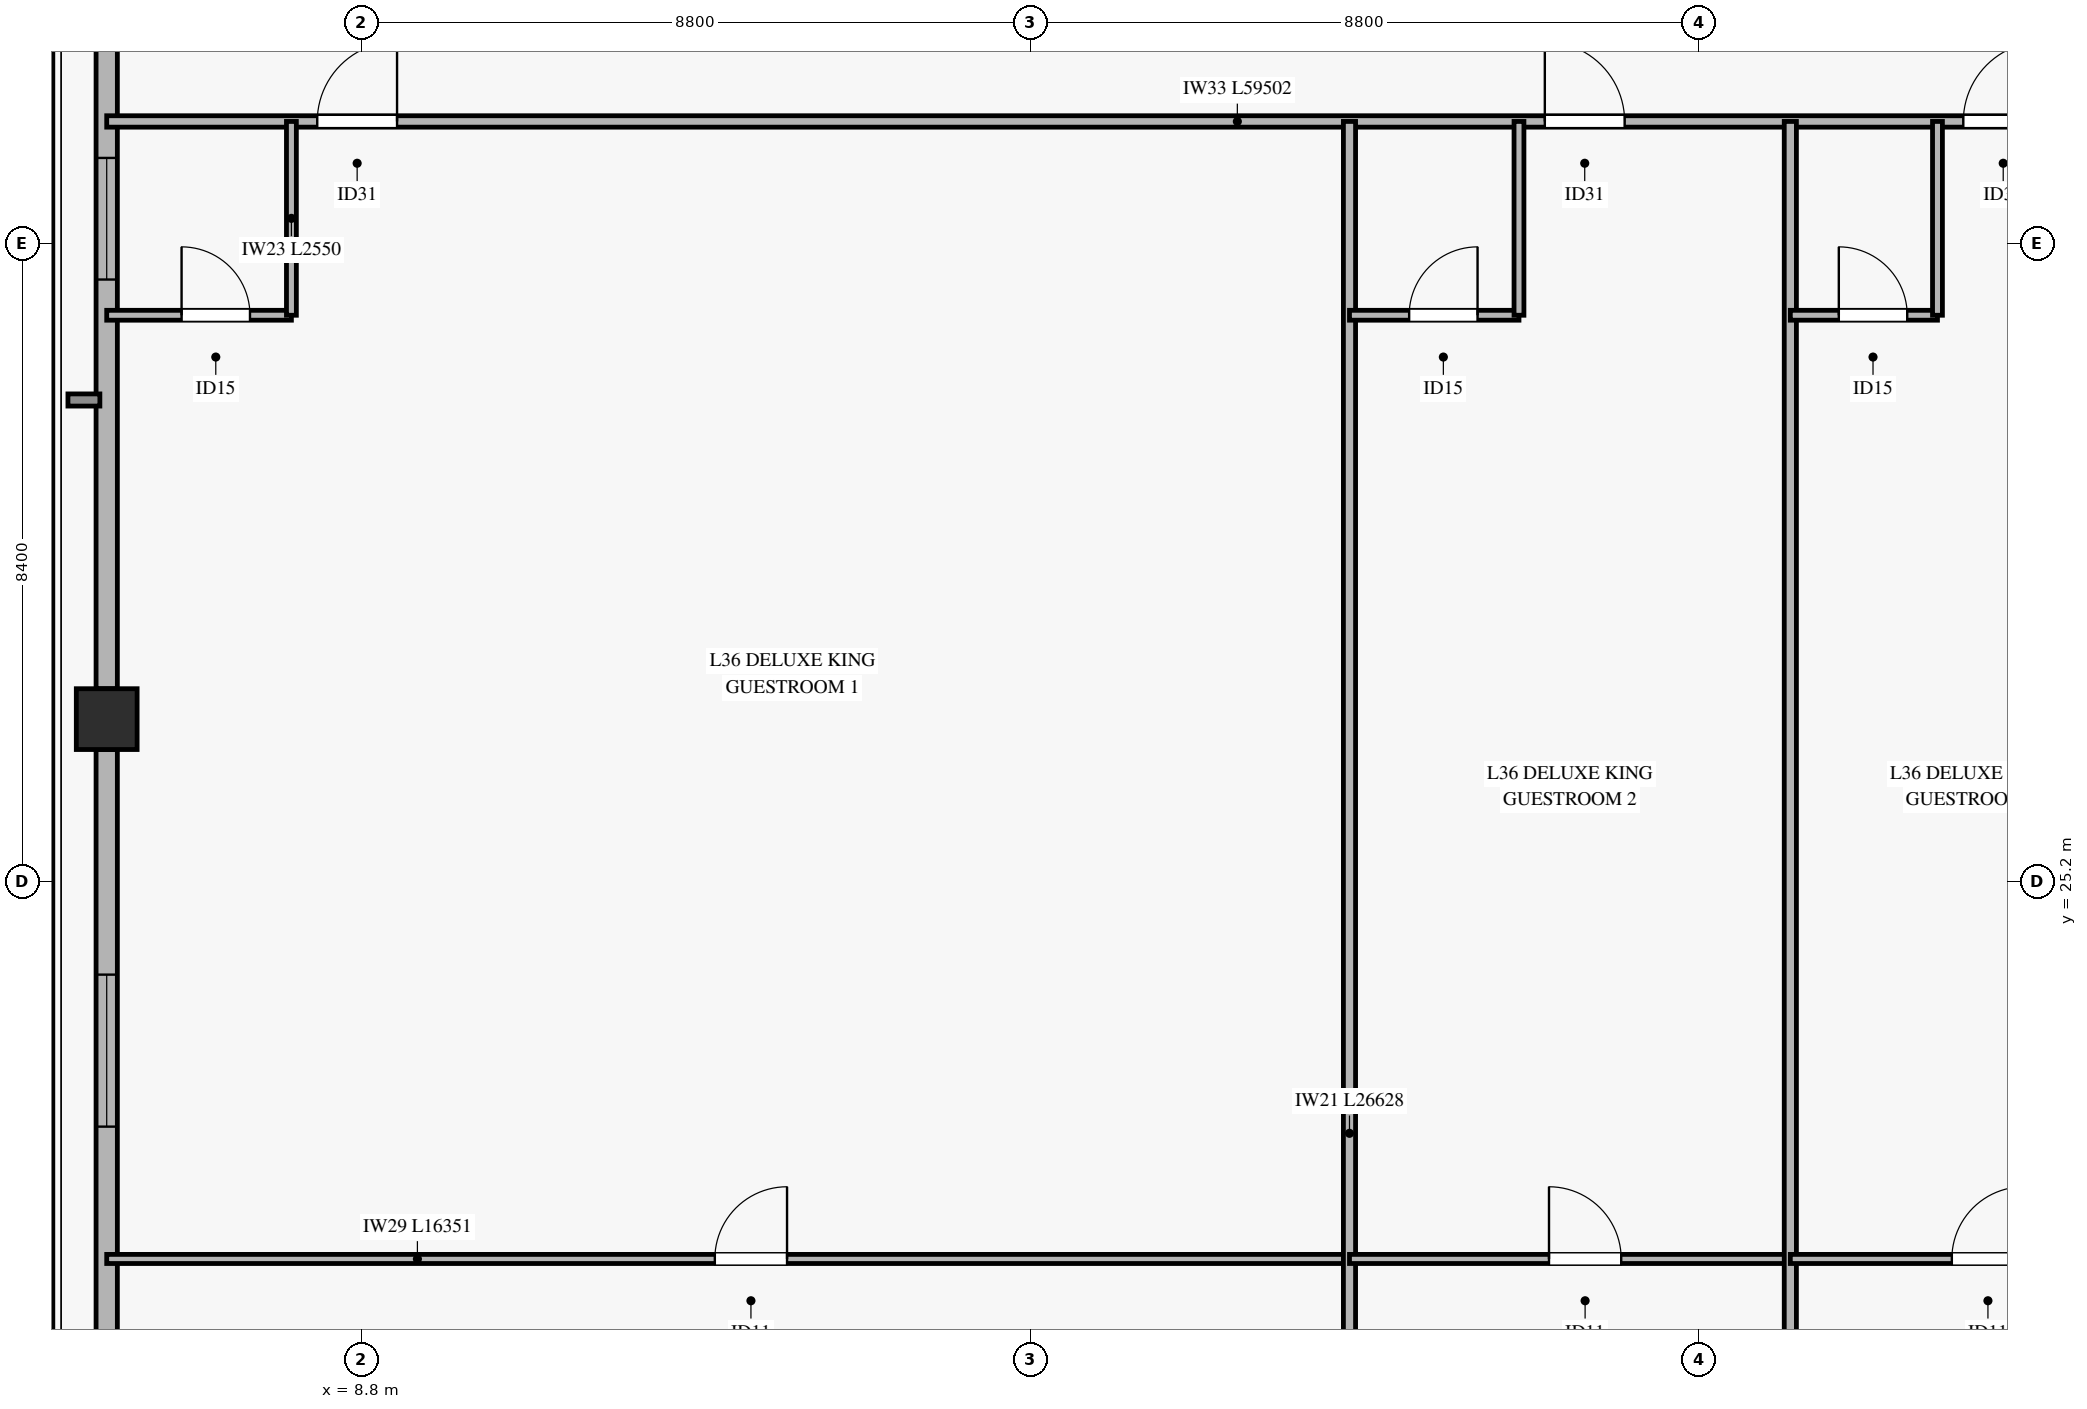
"""IFC4 building model, lengths in metres.
Left out: names, types, materials, properties, quantities, classifications, styles, units other than length and angle.
Written with IfcOpenShell. Run it as: python <this file> out.ifc"""

import sys

from ifc_helpers import new_model, si_unit, direction, frame, frame_2d, origin, origin_2d, place, context, subcontext, project, spatial, rectangle, hollow_rectangle, extrude, source, transform, mapped, element, fill, save


model = new_model("IFC4")
c1 = context("Model", 3, precision=1e-05, world=origin(), true_north=direction((0.0, 1.0)))
c2 = subcontext(c1, "Body", "Model", "MODEL_VIEW")
j1 = project(units=[si_unit("LENGTHUNIT", "METRE"), si_unit("PLANEANGLEUNIT", "RADIAN")], contexts=[c1])
p1 = place(None, origin())
s1 = spatial("IfcSite", under=j1, at=p1, CompositionType="ELEMENT")
p2 = place(p1, origin())
s2 = spatial("IfcBuilding", under=s1, at=p2, CompositionType="ELEMENT")
p3 = place(p2, frame((0.0, 0.0, 149.2)))
s3 = spatial("IfcBuildingStorey", under=s2, at=p3, CompositionType="ELEMENT", Elevation=149.2)
m1 = source(origin(), c2, "Body", "SweptSolid", [
    extrude(hollow_rectangle(XDim=0.8, YDim=0.8, WallThickness=0.036, at=origin_2d()), origin(), (0.0, 0.0, 1.0), 3.27),
])
p4 = place(p3, frame((5.449, 27.336, 0.0), z_axis=(0.0, 0.0, 1.0), x_axis=(1.0, 0.0, 0.0)))
e1 = element("IfcColumn", 1, at=p4, inside=s3, PredefinedType="COLUMN", context=c2, shape_type="MappedRepresentation", body=[
    mapped(m1, transform((0.0, 0.0, 0.0), x_axis=(1.0, 0.0, 0.0), y_axis=(0.0, 1.0, 0.0), z_axis=(0.0, 0.0, 1.0), scale=1.0)),
])
p5 = place(p3, frame((5.449, 11.511, 0.0), z_axis=(0.0, 0.0, 1.0), x_axis=(0.0, 1.0, 0.0)))
e2 = element("IfcWall", 2, at=p5, inside=s3, PredefinedType="SOLIDWALL", context=c2, shape_type="SweptSolid", body=[
    extrude(rectangle(XDim=15.425, YDim=0.28, at=frame_2d((7.712, 0.0))), origin(), (0.0, 0.0, 1.0), 2.75),
])
p6 = place(p5, frame((3.251, 0.0, 0.45)))
e3 = element("IfcOpeningElement", 3, at=p6, cuts=e2, PredefinedType="OPENING", context=c2, shape_type="SweptSolid", body=[
    extrude(rectangle(XDim=2.0, YDim=2.0, at=frame_2d((1.0, 1.0))), frame((0.0, 0.15, 0.0), z_axis=(0.0, -1.0, 0.0), x_axis=(1.0, 0.0, 0.0)), (0.0, 0.0, 1.0), 0.3),
])
p7 = place(p5, frame((10.463, 0.0, 0.45)))
e4 = element("IfcOpeningElement", 4, at=p7, cuts=e2, PredefinedType="OPENING", context=c2, shape_type="SweptSolid", body=[
    extrude(rectangle(XDim=2.0, YDim=2.0, at=frame_2d((1.0, 1.0))), frame((0.0, 0.15, 0.0), z_axis=(0.0, -1.0, 0.0), x_axis=(1.0, 0.0, 0.0)), (0.0, 0.0, 1.0), 0.3),
])
p8 = place(p3, frame((5.449, 27.736, 0.0), z_axis=(0.0, 0.0, 1.0), x_axis=(0.0, 1.0, 0.0)))
e5 = element("IfcWall", 5, at=p8, inside=s3, PredefinedType="SOLIDWALL", context=c2, shape_type="SweptSolid", body=[
    extrude(rectangle(XDim=15.425, YDim=0.28, at=frame_2d((7.712, 0.0))), origin(), (0.0, 0.0, 1.0), 2.75),
])
p9 = place(p8, frame((5.384, 0.0, 0.45)))
e6 = element("IfcOpeningElement", 6, at=p9, cuts=e5, PredefinedType="OPENING", context=c2, shape_type="SweptSolid", body=[
    extrude(rectangle(XDim=1.6, YDim=2.0, at=frame_2d((0.8, 1.0))), frame((0.0, 0.15, 0.0), z_axis=(0.0, -1.0, 0.0), x_axis=(1.0, 0.0, 0.0)), (0.0, 0.0, 1.0), 0.3),
])
p10 = place(p3, frame((5.449, 35.2, 0.0), z_axis=(0.0, 0.0, 1.0), x_axis=(1.0, 0.0, 0.0)))
e7 = element("IfcWall", 7, at=p10, inside=s3, PredefinedType="PARTITIONING", context=c2, shape_type="SweptSolid", body=[
    extrude(rectangle(XDim=59.502, YDim=0.15, at=frame_2d((29.751, 0.0))), origin(), (0.0, 0.0, 1.0), 2.455),
])
p11 = place(p10, frame((2.77, 0.0, 0.0)))
e8 = element("IfcOpeningElement", 8, at=p11, cuts=e7, PredefinedType="OPENING", context=c2, shape_type="SweptSolid", body=[
    extrude(rectangle(XDim=1.05, YDim=2.15, at=frame_2d((0.525, 1.075))), frame((0.0, 0.085, 0.0), z_axis=(0.0, -1.0, 0.0), x_axis=(1.0, 0.0, 0.0)), (0.0, 0.0, 1.0), 0.17),
])
p12 = place(p10, frame((18.921, 0.0, 0.0)))
e9 = element("IfcOpeningElement", 9, at=p12, cuts=e7, PredefinedType="OPENING", context=c2, shape_type="SweptSolid", body=[
    extrude(rectangle(XDim=1.05, YDim=2.15, at=frame_2d((0.525, 1.075))), frame((0.0, 0.085, 0.0), z_axis=(0.0, -1.0, 0.0), x_axis=(1.0, 0.0, 0.0)), (0.0, 0.0, 1.0), 0.17),
])
p13 = place(p10, frame((24.427, 0.0, 0.0)))
e10 = element("IfcOpeningElement", 10, at=p13, cuts=e7, PredefinedType="OPENING", context=c2, shape_type="SweptSolid", body=[
    extrude(rectangle(XDim=1.05, YDim=2.15, at=frame_2d((0.525, 1.075))), frame((0.0, 0.085, 0.0), z_axis=(0.0, -1.0, 0.0), x_axis=(1.0, 0.0, 0.0)), (0.0, 0.0, 1.0), 0.17),
])
p14 = place(p10, frame((29.227, 0.0, 0.0)))
e11 = element("IfcOpeningElement", 11, at=p14, cuts=e7, PredefinedType="OPENING", context=c2, shape_type="SweptSolid", body=[
    extrude(rectangle(XDim=1.05, YDim=2.15, at=frame_2d((0.525, 1.075))), frame((0.0, 0.085, 0.0), z_axis=(0.0, -1.0, 0.0), x_axis=(1.0, 0.0, 0.0)), (0.0, 0.0, 1.0), 0.17),
])
p15 = place(p10, frame((34.027, 0.0, 0.0)))
e12 = element("IfcOpeningElement", 12, at=p15, cuts=e7, PredefinedType="OPENING", context=c2, shape_type="SweptSolid", body=[
    extrude(rectangle(XDim=1.05, YDim=2.15, at=frame_2d((0.525, 1.075))), frame((0.0, 0.085, 0.0), z_axis=(0.0, -1.0, 0.0), x_axis=(1.0, 0.0, 0.0)), (0.0, 0.0, 1.0), 0.17),
])
p16 = place(p10, frame((38.571, 0.0, 0.0)))
e13 = element("IfcOpeningElement", 13, at=p16, cuts=e7, PredefinedType="OPENING", context=c2, shape_type="SweptSolid", body=[
    extrude(rectangle(XDim=1.05, YDim=2.15, at=frame_2d((0.525, 1.075))), frame((0.0, 0.085, 0.0), z_axis=(0.0, -1.0, 0.0), x_axis=(1.0, 0.0, 0.0)), (0.0, 0.0, 1.0), 0.17),
])
p17 = place(p10, frame((42.721, 0.0, 0.0)))
e14 = element("IfcOpeningElement", 14, at=p17, cuts=e7, PredefinedType="OPENING", context=c2, shape_type="SweptSolid", body=[
    extrude(rectangle(XDim=1.05, YDim=2.15, at=frame_2d((0.525, 1.075))), frame((0.0, 0.085, 0.0), z_axis=(0.0, -1.0, 0.0), x_axis=(1.0, 0.0, 0.0)), (0.0, 0.0, 1.0), 0.17),
])
p18 = place(p3, frame((5.449, 32.65, 0.0), z_axis=(0.0, 0.0, 1.0), x_axis=(1.0, 0.0, 0.0)))
e15 = element("IfcWall", 15, at=p18, inside=s3, PredefinedType="PARTITIONING", context=c2, shape_type="SweptSolid", body=[
    extrude(rectangle(XDim=2.43, YDim=0.13, at=frame_2d((1.215, 0.0))), origin(), (0.0, 0.0, 1.0), 2.755),
])
p19 = place(p18, frame((0.985, 0.0, 0.0)))
e16 = element("IfcOpeningElement", 16, at=p19, cuts=e15, PredefinedType="OPENING", context=c2, shape_type="SweptSolid", body=[
    extrude(rectangle(XDim=0.9, YDim=2.1, at=frame_2d((0.45, 1.05))), frame((0.0, 0.075, 0.0), z_axis=(0.0, -1.0, 0.0), x_axis=(1.0, 0.0, 0.0)), (0.0, 0.0, 1.0), 0.15),
])
p20 = place(p3, frame((7.879, 32.65, 0.0), z_axis=(0.0, 0.0, 1.0), x_axis=(0.0, 1.0, 0.0)))
e17 = element("IfcWall", 17, at=p20, inside=s3, PredefinedType="PARTITIONING", context=c2, shape_type="SweptSolid", body=[
    extrude(rectangle(XDim=2.55, YDim=0.13, at=frame_2d((1.275, 0.0))), origin(), (0.0, 0.0, 1.0), 3.27),
])
p21 = place(p3, frame((5.449, 20.233, 0.0), z_axis=(0.0, 0.0, 1.0), x_axis=(1.0, 0.0, 0.0)))
e18 = element("IfcWall", 18, at=p21, inside=s3, PredefinedType="PARTITIONING", context=c2, shape_type="SweptSolid", body=[
    extrude(rectangle(XDim=16.351, YDim=0.12, at=frame_2d((8.176, 0.0))), origin(), (0.0, 0.0, 1.0), 2.455),
])
p22 = place(p21, frame((8.001, 0.0, 0.0)))
e19 = element("IfcOpeningElement", 19, at=p22, cuts=e18, PredefinedType="OPENING", context=c2, shape_type="SweptSolid", body=[
    extrude(rectangle(XDim=0.95, YDim=2.1, at=frame_2d((0.475, 1.05))), frame((0.0, 0.07, 0.0), z_axis=(0.0, -1.0, 0.0), x_axis=(1.0, 0.0, 0.0)), (0.0, 0.0, 1.0), 0.14),
])
p23 = place(p3, frame((21.8, 8.572, 0.0), z_axis=(0.0, 0.0, 1.0), x_axis=(0.0, 1.0, 0.0)))
e20 = element("IfcWall", 20, at=p23, inside=s3, PredefinedType="PARTITIONING", context=c2, shape_type="SweptSolid", body=[
    extrude(rectangle(XDim=26.628, YDim=0.16, at=frame_2d((13.314, 0.0))), origin(), (0.0, 0.0, 1.0), 2.755),
])
p24 = place(p3, frame((21.8, 32.65, 0.0), z_axis=(0.0, 0.0, 1.0), x_axis=(1.0, 0.0, 0.0)))
e21 = element("IfcWall", 21, at=p24, inside=s3, PredefinedType="PARTITIONING", context=c2, shape_type="SweptSolid", body=[
    extrude(rectangle(XDim=2.23, YDim=0.13, at=frame_2d((1.115, 0.0))), origin(), (0.0, 0.0, 1.0), 2.805),
])
p25 = place(p24, frame((0.785, 0.0, 0.0)))
e22 = element("IfcOpeningElement", 22, at=p25, cuts=e21, PredefinedType="OPENING", context=c2, shape_type="SweptSolid", body=[
    extrude(rectangle(XDim=0.9, YDim=2.1, at=frame_2d((0.45, 1.05))), frame((0.0, 0.075, 0.0), z_axis=(0.0, -1.0, 0.0), x_axis=(1.0, 0.0, 0.0)), (0.0, 0.0, 1.0), 0.15),
])
p26 = place(p3, frame((24.03, 32.65, 0.0), z_axis=(0.0, 0.0, 1.0), x_axis=(0.0, 1.0, 0.0)))
e23 = element("IfcWall", 23, at=p26, inside=s3, PredefinedType="PARTITIONING", context=c2, shape_type="SweptSolid", body=[
    extrude(rectangle(XDim=2.55, YDim=0.13, at=frame_2d((1.275, 0.0))), origin(), (0.0, 0.0, 1.0), 2.805),
])
p27 = place(p3, frame((21.8, 20.233, 0.0), z_axis=(0.0, 0.0, 1.0), x_axis=(1.0, 0.0, 0.0)))
e24 = element("IfcWall", 24, at=p27, inside=s3, PredefinedType="PARTITIONING", context=c2, shape_type="SweptSolid", body=[
    extrude(rectangle(XDim=5.8, YDim=0.12, at=frame_2d((2.9, 0.0))), origin(), (0.0, 0.0, 1.0), 3.27),
])
p28 = place(p27, frame((2.625, 0.0, 0.0)))
e25 = element("IfcOpeningElement", 25, at=p28, cuts=e24, PredefinedType="OPENING", context=c2, shape_type="SweptSolid", body=[
    extrude(rectangle(XDim=0.95, YDim=2.1, at=frame_2d((0.475, 1.05))), frame((0.0, 0.07, 0.0), z_axis=(0.0, -1.0, 0.0), x_axis=(1.0, 0.0, 0.0)), (0.0, 0.0, 1.0), 0.14),
])
p29 = place(p3, frame((27.6, 8.572, 0.0), z_axis=(0.0, 0.0, 1.0), x_axis=(0.0, 1.0, 0.0)))
e26 = element("IfcWall", 26, at=p29, inside=s3, PredefinedType="PARTITIONING", context=c2, shape_type="SweptSolid", body=[
    extrude(rectangle(XDim=26.628, YDim=0.16, at=frame_2d((13.314, 0.0))), origin(), (0.0, 0.0, 1.0), 2.755),
])
p30 = place(p3, frame((27.6, 32.65, 0.0), z_axis=(0.0, 0.0, 1.0), x_axis=(1.0, 0.0, 0.0)))
e27 = element("IfcWall", 27, at=p30, inside=s3, PredefinedType="PARTITIONING", context=c2, shape_type="SweptSolid", body=[
    extrude(rectangle(XDim=1.936, YDim=0.13, at=frame_2d((0.968, 0.0))), origin(), (0.0, 0.0, 1.0), 2.805),
])
p31 = place(p30, frame((0.638, 0.0, 0.0)))
e28 = element("IfcOpeningElement", 28, at=p31, cuts=e27, PredefinedType="OPENING", context=c2, shape_type="SweptSolid", body=[
    extrude(rectangle(XDim=0.9, YDim=2.1, at=frame_2d((0.45, 1.05))), frame((0.0, 0.075, 0.0), z_axis=(0.0, -1.0, 0.0), x_axis=(1.0, 0.0, 0.0)), (0.0, 0.0, 1.0), 0.15),
])
p32 = place(p3, frame((29.536, 32.65, 0.0), z_axis=(0.0, 0.0, 1.0), x_axis=(0.0, 1.0, 0.0)))
e29 = element("IfcWall", 29, at=p32, inside=s3, PredefinedType="PARTITIONING", context=c2, shape_type="SweptSolid", body=[
    extrude(rectangle(XDim=2.55, YDim=0.13, at=frame_2d((1.275, 0.0))), origin(), (0.0, 0.0, 1.0), 2.805),
])
p33 = place(p3, frame((27.6, 20.233, 0.0), z_axis=(0.0, 0.0, 1.0), x_axis=(1.0, 0.0, 0.0)))
e30 = element("IfcWall", 30, at=p33, inside=s3, PredefinedType="PARTITIONING", context=c2, shape_type="SweptSolid", body=[
    extrude(rectangle(XDim=4.8, YDim=0.12, at=frame_2d((2.4, 0.0))), origin(), (0.0, 0.0, 1.0), 2.455),
])
p34 = place(p33, frame((2.125, 0.0, 0.0)))
e31 = element("IfcOpeningElement", 31, at=p34, cuts=e30, PredefinedType="OPENING", context=c2, shape_type="SweptSolid", body=[
    extrude(rectangle(XDim=0.95, YDim=2.1, at=frame_2d((0.475, 1.05))), frame((0.0, 0.07, 0.0), z_axis=(0.0, -1.0, 0.0), x_axis=(1.0, 0.0, 0.0)), (0.0, 0.0, 1.0), 0.14),
])
m2 = source(origin(), c2, "Body", "SweptSolid", [
    extrude(rectangle(XDim=2.0, YDim=2.0, at=frame_2d((1.0, 1.0))), frame((0.0, 0.03, 0.0), z_axis=(0.0, -1.0, 0.0), x_axis=(1.0, 0.0, 0.0)), (0.0, 0.0, 1.0), 0.06),
])
p35 = place(p7, origin())
e32 = element("IfcWindow", 32, at=p35, inside=s3, PartitioningType="SINGLE_PANEL", PredefinedType="WINDOW", context=c2, shape_type="MappedRepresentation", body=[
    mapped(m2, transform((0.0, 0.0, 0.0), x_axis=(1.0, 0.0, 0.0), y_axis=(0.0, 1.0, 0.0), z_axis=(0.0, 0.0, 1.0), scale=1.0)),
])
fill(e4, e32)
m3 = source(origin(), c2, "Body", "SweptSolid", [
    extrude(rectangle(XDim=1.6, YDim=2.0, at=frame_2d((0.8, 1.0))), frame((0.0, 0.03, 0.0), z_axis=(0.0, -1.0, 0.0), x_axis=(1.0, 0.0, 0.0)), (0.0, 0.0, 1.0), 0.06),
])
p36 = place(p9, origin())
e33 = element("IfcWindow", 33, at=p36, inside=s3, PartitioningType="SINGLE_PANEL", PredefinedType="WINDOW", context=c2, shape_type="MappedRepresentation", body=[
    mapped(m3, transform((0.0, 0.0, 0.0), x_axis=(1.0, 0.0, 0.0), y_axis=(0.0, 1.0, 0.0), z_axis=(0.0, 0.0, 1.0), scale=1.0)),
])
fill(e6, e33)
m4 = source(origin(), c2, "Body", "SweptSolid", [
    extrude(rectangle(XDim=1.05, YDim=2.15, at=frame_2d((0.525, 1.075))), frame((0.0, 0.025, 0.0), z_axis=(0.0, -1.0, 0.0), x_axis=(1.0, 0.0, 0.0)), (0.0, 0.0, 1.0), 0.05),
])
p37 = place(p11, origin())
e34 = element("IfcDoor", 34, at=p37, inside=s3, OperationType="SINGLE_SWING_RIGHT", PredefinedType="DOOR", context=c2, shape_type="MappedRepresentation", body=[
    mapped(m4, transform((0.0, 0.0, 0.0), x_axis=(1.0, 0.0, 0.0), y_axis=(0.0, 1.0, 0.0), z_axis=(0.0, 0.0, 1.0), scale=1.0)),
])
fill(e8, e34)
m5 = source(origin(), c2, "Body", "SweptSolid", [
    extrude(rectangle(XDim=0.9, YDim=2.1, at=frame_2d((0.45, 1.05))), frame((0.0, 0.025, 0.0), z_axis=(0.0, -1.0, 0.0), x_axis=(1.0, 0.0, 0.0)), (0.0, 0.0, 1.0), 0.05),
])
p38 = place(p19, origin())
e35 = element("IfcDoor", 35, at=p38, inside=s3, OperationType="SINGLE_SWING_LEFT", PredefinedType="DOOR", context=c2, shape_type="MappedRepresentation", body=[
    mapped(m5, transform((0.0, 0.0, 0.0), x_axis=(1.0, 0.0, 0.0), y_axis=(0.0, 1.0, 0.0), z_axis=(0.0, 0.0, 1.0), scale=1.0)),
])
fill(e16, e35)
m6 = source(origin(), c2, "Body", "SweptSolid", [
    extrude(rectangle(XDim=0.95, YDim=2.1, at=frame_2d((0.475, 1.05))), frame((0.0, 0.025, 0.0), z_axis=(0.0, -1.0, 0.0), x_axis=(1.0, 0.0, 0.0)), (0.0, 0.0, 1.0), 0.05),
])
p39 = place(p22, origin())
e36 = element("IfcDoor", 36, at=p39, inside=s3, OperationType="SINGLE_SWING_RIGHT", PredefinedType="DOOR", context=c2, shape_type="MappedRepresentation", body=[
    mapped(m6, transform((0.0, 0.0, 0.0), x_axis=(1.0, 0.0, 0.0), y_axis=(0.0, 1.0, 0.0), z_axis=(0.0, 0.0, 1.0), scale=1.0)),
])
fill(e19, e36)
p40 = place(p12, origin())
e37 = element("IfcDoor", 37, at=p40, inside=s3, OperationType="SINGLE_SWING_LEFT", PredefinedType="DOOR", context=c2, shape_type="MappedRepresentation", body=[
    mapped(m4, transform((0.0, 0.0, 0.0), x_axis=(1.0, 0.0, 0.0), y_axis=(0.0, 1.0, 0.0), z_axis=(0.0, 0.0, 1.0), scale=1.0)),
])
fill(e9, e37)
p41 = place(p25, origin())
e38 = element("IfcDoor", 38, at=p41, inside=s3, OperationType="SINGLE_SWING_RIGHT", PredefinedType="DOOR", context=c2, shape_type="MappedRepresentation", body=[
    mapped(m5, transform((0.0, 0.0, 0.0), x_axis=(1.0, 0.0, 0.0), y_axis=(0.0, 1.0, 0.0), z_axis=(0.0, 0.0, 1.0), scale=1.0)),
])
fill(e22, e38)
p42 = place(p28, origin())
e39 = element("IfcDoor", 39, at=p42, inside=s3, OperationType="SINGLE_SWING_LEFT", PredefinedType="DOOR", context=c2, shape_type="MappedRepresentation", body=[
    mapped(m6, transform((0.0, 0.0, 0.0), x_axis=(1.0, 0.0, 0.0), y_axis=(0.0, 1.0, 0.0), z_axis=(0.0, 0.0, 1.0), scale=1.0)),
])
fill(e25, e39)
p43 = place(p13, origin())
e40 = element("IfcDoor", 40, at=p43, inside=s3, OperationType="SINGLE_SWING_RIGHT", PredefinedType="DOOR", context=c2, shape_type="MappedRepresentation", body=[
    mapped(m4, transform((0.0, 0.0, 0.0), x_axis=(1.0, 0.0, 0.0), y_axis=(0.0, 1.0, 0.0), z_axis=(0.0, 0.0, 1.0), scale=1.0)),
])
fill(e10, e40)
p44 = place(p31, origin())
e41 = element("IfcDoor", 41, at=p44, inside=s3, OperationType="SINGLE_SWING_LEFT", PredefinedType="DOOR", context=c2, shape_type="MappedRepresentation", body=[
    mapped(m5, transform((0.0, 0.0, 0.0), x_axis=(1.0, 0.0, 0.0), y_axis=(0.0, 1.0, 0.0), z_axis=(0.0, 0.0, 1.0), scale=1.0)),
])
fill(e28, e41)
p45 = place(p34, origin())
e42 = element("IfcDoor", 42, at=p45, inside=s3, OperationType="SINGLE_SWING_RIGHT", PredefinedType="DOOR", context=c2, shape_type="MappedRepresentation", body=[
    mapped(m6, transform((0.0, 0.0, 0.0), x_axis=(1.0, 0.0, 0.0), y_axis=(0.0, 1.0, 0.0), z_axis=(0.0, 0.0, 1.0), scale=1.0)),
])
fill(e31, e42)
save(model, sys.argv[1])
